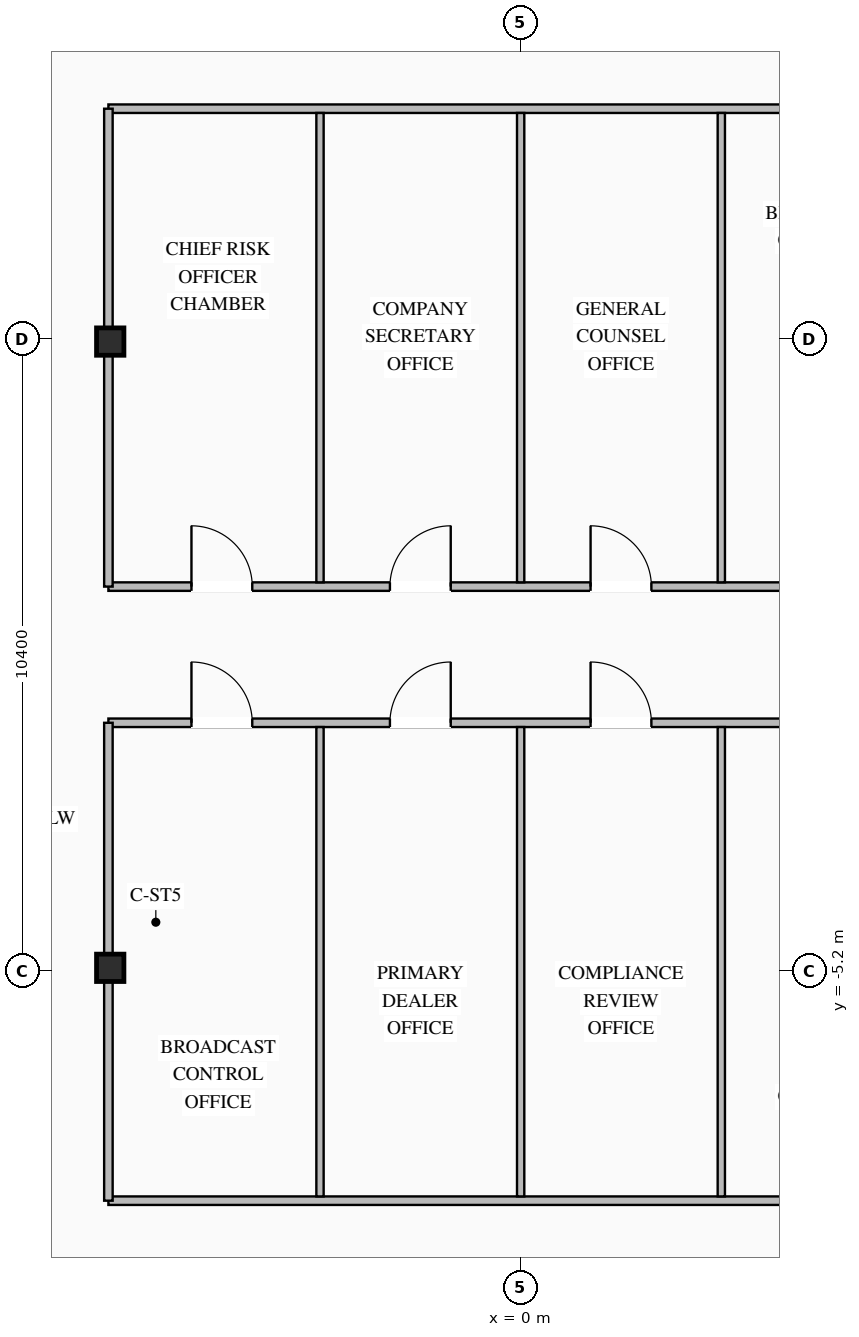
"""IFC4 building model, lengths in metres.
Left out: names, types, materials, properties, quantities, classifications, styles, units other than length and angle.
Written with IfcOpenShell. Run it as: python <this file> out.ifc"""

import sys

from ifc_helpers import new_model, si_unit, direction, frame, frame_2d, origin, origin_2d, place, context, subcontext, project, spatial, rectangle, i_section, extrude, element, fill, save


model = new_model("IFC4")
c1 = context("Model", 3, precision=1e-05, world=origin(), true_north=direction((0.0, 1.0)))
c2 = subcontext(c1, "Body", "Model", "MODEL_VIEW")
j1 = project(units=[si_unit("LENGTHUNIT", "METRE"), si_unit("PLANEANGLEUNIT", "RADIAN")], contexts=[c1])
p1 = place(None, origin())
s1 = spatial("IfcSite", under=j1, at=p1, CompositionType="ELEMENT")
p2 = place(p1, origin())
s2 = spatial("IfcBuilding", under=s1, at=p2, CompositionType="ELEMENT")
p3 = place(p2, frame((0.0, 0.0, 279.3)))
s3 = spatial("IfcBuildingStorey", under=s2, at=p3, CompositionType="ELEMENT", Elevation=279.3)
for number, where, z_axis, x_axis in (
    (1, (-6.75, -5.15, 0.0), (0.0, 0.0, 1.0), (1.0, 0.0, 0.0)),
    (2, (-6.75, 5.15, 0.0), (0.0, 0.0, 1.0), (1.0, 0.0, 0.0)),
):
    element("IfcColumn", number, at=place(p3, frame(where, z_axis=z_axis, x_axis=x_axis)), inside=s3, PredefinedType="COLUMN", context=c2, shape_type="SweptSolid", body=[
        extrude(i_section(OverallWidth=0.45, OverallDepth=0.45, WebThickness=0.022, FlangeThickness=0.032, at=origin_2d()), origin(), (0.0, 0.0, 1.0), 3.45),
    ])
p4 = place(p3, frame((-6.78, 1.12, 0.0), z_axis=(0.0, 0.0, 1.0), x_axis=(1.0, 0.0, 0.0)))
e3 = element("IfcWall", 3, at=p4, inside=s3, PredefinedType="STANDARD", context=c2, shape_type="SweptSolid", body=[
    extrude(rectangle(XDim=13.56, YDim=0.14, at=frame_2d((6.78, 0.0))), origin(), (0.0, 0.0, 1.0), 3.25),
])
p5 = place(p4, frame((1.366, 0.0, 0.0)))
e4 = element("IfcOpeningElement", 4, at=p5, cuts=e3, PredefinedType="OPENING", context=c2, shape_type="SweptSolid", body=[
    extrude(rectangle(XDim=1.0, YDim=2.08, at=frame_2d((0.5, 1.04))), frame((0.0, 0.08, 0.0), z_axis=(0.0, -1.0, 0.0), x_axis=(1.0, 0.0, 0.0)), (0.0, 0.0, 1.0), 0.16),
])
p6 = place(p4, frame((4.63, 0.0, 0.0)))
e5 = element("IfcOpeningElement", 5, at=p6, cuts=e3, PredefinedType="OPENING", context=c2, shape_type="SweptSolid", body=[
    extrude(rectangle(XDim=1.0, YDim=2.08, at=frame_2d((0.5, 1.04))), frame((0.0, 0.08, 0.0), z_axis=(0.0, -1.0, 0.0), x_axis=(1.0, 0.0, 0.0)), (0.0, 0.0, 1.0), 0.16),
])
p7 = place(p4, frame((7.93, 0.0, 0.0)))
e6 = element("IfcOpeningElement", 6, at=p7, cuts=e3, PredefinedType="OPENING", context=c2, shape_type="SweptSolid", body=[
    extrude(rectangle(XDim=1.0, YDim=2.08, at=frame_2d((0.5, 1.04))), frame((0.0, 0.08, 0.0), z_axis=(0.0, -1.0, 0.0), x_axis=(1.0, 0.0, 0.0)), (0.0, 0.0, 1.0), 0.16),
])
p8 = place(p4, frame((11.194, 0.0, 0.0)))
e7 = element("IfcOpeningElement", 7, at=p8, cuts=e3, PredefinedType="OPENING", context=c2, shape_type="SweptSolid", body=[
    extrude(rectangle(XDim=1.0, YDim=2.08, at=frame_2d((0.5, 1.04))), frame((0.0, 0.08, 0.0), z_axis=(0.0, -1.0, 0.0), x_axis=(1.0, 0.0, 0.0)), (0.0, 0.0, 1.0), 0.16),
])
p9 = place(p3, frame((-6.78, 8.98, 0.0), z_axis=(0.0, 0.0, 1.0), x_axis=(1.0, 0.0, 0.0)))
e8 = element("IfcWall", 8, at=p9, inside=s3, PredefinedType="STANDARD", context=c2, shape_type="SweptSolid", body=[
    extrude(rectangle(XDim=13.56, YDim=0.14, at=frame_2d((6.78, 0.0))), origin(), (0.0, 0.0, 1.0), 3.25),
])
p10 = place(p3, frame((-6.78, 1.12, 0.0), z_axis=(0.0, 0.0, 1.0), x_axis=(0.0, 1.0, 0.0)))
e9 = element("IfcWall", 9, at=p10, inside=s3, PredefinedType="STANDARD", context=c2, shape_type="SweptSolid", body=[
    extrude(rectangle(XDim=7.86, YDim=0.14, at=frame_2d((3.93, 0.0))), origin(), (0.0, 0.0, 1.0), 2.645),
])
for number, where, z_axis, x_axis in (
    (10, (-3.3, 1.19, 0.0), (0.0, 0.0, 1.0), (0.0, 1.0, 0.0)),
    (11, (0.0, 1.19, 0.0), (0.0, 0.0, 1.0), (0.0, 1.0, 0.0)),
    (12, (3.3, 1.19, 0.0), (0.0, 0.0, 1.0), (0.0, 1.0, 0.0)),
):
    element("IfcWall", number, at=place(p3, frame(where, z_axis=z_axis, x_axis=x_axis)), inside=s3, PredefinedType="STANDARD", context=c2, shape_type="SweptSolid", body=[
        extrude(rectangle(XDim=7.72, YDim=0.12, at=frame_2d((3.86, 0.0))), origin(), (0.0, 0.0, 1.0), 3.25),
    ])
p11 = place(p3, frame((-6.78, -1.12, 0.0), z_axis=(0.0, 0.0, 1.0), x_axis=(1.0, 0.0, 0.0)))
e13 = element("IfcWall", 13, at=p11, inside=s3, PredefinedType="STANDARD", context=c2, shape_type="SweptSolid", body=[
    extrude(rectangle(XDim=13.56, YDim=0.14, at=frame_2d((6.78, 0.0))), origin(), (0.0, 0.0, 1.0), 3.25),
])
p12 = place(p11, frame((1.366, 0.0, 0.0)))
e14 = element("IfcOpeningElement", 14, at=p12, cuts=e13, PredefinedType="OPENING", context=c2, shape_type="SweptSolid", body=[
    extrude(rectangle(XDim=1.0, YDim=2.08, at=frame_2d((0.5, 1.04))), frame((0.0, 0.08, 0.0), z_axis=(0.0, -1.0, 0.0), x_axis=(1.0, 0.0, 0.0)), (0.0, 0.0, 1.0), 0.16),
])
p13 = place(p11, frame((4.63, 0.0, 0.0)))
e15 = element("IfcOpeningElement", 15, at=p13, cuts=e13, PredefinedType="OPENING", context=c2, shape_type="SweptSolid", body=[
    extrude(rectangle(XDim=1.0, YDim=2.08, at=frame_2d((0.5, 1.04))), frame((0.0, 0.08, 0.0), z_axis=(0.0, -1.0, 0.0), x_axis=(1.0, 0.0, 0.0)), (0.0, 0.0, 1.0), 0.16),
])
p14 = place(p11, frame((7.93, 0.0, 0.0)))
e16 = element("IfcOpeningElement", 16, at=p14, cuts=e13, PredefinedType="OPENING", context=c2, shape_type="SweptSolid", body=[
    extrude(rectangle(XDim=1.0, YDim=2.08, at=frame_2d((0.5, 1.04))), frame((0.0, 0.08, 0.0), z_axis=(0.0, -1.0, 0.0), x_axis=(1.0, 0.0, 0.0)), (0.0, 0.0, 1.0), 0.16),
])
p15 = place(p11, frame((11.194, 0.0, 0.0)))
e17 = element("IfcOpeningElement", 17, at=p15, cuts=e13, PredefinedType="OPENING", context=c2, shape_type="SweptSolid", body=[
    extrude(rectangle(XDim=1.0, YDim=2.08, at=frame_2d((0.5, 1.04))), frame((0.0, 0.08, 0.0), z_axis=(0.0, -1.0, 0.0), x_axis=(1.0, 0.0, 0.0)), (0.0, 0.0, 1.0), 0.16),
])
p16 = place(p3, frame((-6.78, -8.98, 0.0), z_axis=(0.0, 0.0, 1.0), x_axis=(1.0, 0.0, 0.0)))
e18 = element("IfcWall", 18, at=p16, inside=s3, PredefinedType="STANDARD", context=c2, shape_type="SweptSolid", body=[
    extrude(rectangle(XDim=13.56, YDim=0.14, at=frame_2d((6.78, 0.0))), origin(), (0.0, 0.0, 1.0), 3.25),
])
p17 = place(p3, frame((-6.78, -8.98, 0.0), z_axis=(0.0, 0.0, 1.0), x_axis=(0.0, 1.0, 0.0)))
e19 = element("IfcWall", 19, at=p17, inside=s3, PredefinedType="STANDARD", context=c2, shape_type="SweptSolid", body=[
    extrude(rectangle(XDim=7.86, YDim=0.14, at=frame_2d((3.93, 0.0))), origin(), (0.0, 0.0, 1.0), 2.645),
])
for number, where, z_axis, x_axis in (
    (20, (-3.3, -8.91, 0.0), (0.0, 0.0, 1.0), (0.0, 1.0, 0.0)),
    (21, (0.0, -8.91, 0.0), (0.0, 0.0, 1.0), (0.0, 1.0, 0.0)),
    (22, (3.3, -8.91, 0.0), (0.0, 0.0, 1.0), (0.0, 1.0, 0.0)),
):
    element("IfcWall", number, at=place(p3, frame(where, z_axis=z_axis, x_axis=x_axis)), inside=s3, PredefinedType="STANDARD", context=c2, shape_type="SweptSolid", body=[
        extrude(rectangle(XDim=7.72, YDim=0.12, at=frame_2d((3.86, 0.0))), origin(), (0.0, 0.0, 1.0), 3.25),
    ])
p18 = place(p5, origin())
e23 = element("IfcDoor", 23, at=p18, inside=s3, OperationType="SINGLE_SWING_LEFT", PredefinedType="DOOR", context=c2, shape_type="SweptSolid", body=[
    extrude(rectangle(XDim=1.0, YDim=2.08, at=frame_2d((0.5, 1.04))), frame((0.0, 0.025, 0.0), z_axis=(0.0, -1.0, 0.0), x_axis=(1.0, 0.0, 0.0)), (0.0, 0.0, 1.0), 0.05),
])
fill(e4, e23)
p19 = place(p6, origin())
e24 = element("IfcDoor", 24, at=p19, inside=s3, OperationType="SINGLE_SWING_RIGHT", PredefinedType="DOOR", context=c2, shape_type="SweptSolid", body=[
    extrude(rectangle(XDim=1.0, YDim=2.08, at=frame_2d((0.5, 1.04))), frame((0.0, 0.025, 0.0), z_axis=(0.0, -1.0, 0.0), x_axis=(1.0, 0.0, 0.0)), (0.0, 0.0, 1.0), 0.05),
])
fill(e5, e24)
p20 = place(p7, origin())
e25 = element("IfcDoor", 25, at=p20, inside=s3, OperationType="SINGLE_SWING_LEFT", PredefinedType="DOOR", context=c2, shape_type="SweptSolid", body=[
    extrude(rectangle(XDim=1.0, YDim=2.08, at=frame_2d((0.5, 1.04))), frame((0.0, 0.025, 0.0), z_axis=(0.0, -1.0, 0.0), x_axis=(1.0, 0.0, 0.0)), (0.0, 0.0, 1.0), 0.05),
])
fill(e6, e25)
p21 = place(p12, origin())
e26 = element("IfcDoor", 26, at=p21, inside=s3, OperationType="SINGLE_SWING_LEFT", PredefinedType="DOOR", context=c2, shape_type="SweptSolid", body=[
    extrude(rectangle(XDim=1.0, YDim=2.08, at=frame_2d((0.5, 1.04))), frame((0.0, 0.025, 0.0), z_axis=(0.0, -1.0, 0.0), x_axis=(1.0, 0.0, 0.0)), (0.0, 0.0, 1.0), 0.05),
])
fill(e14, e26)
p22 = place(p13, origin())
e27 = element("IfcDoor", 27, at=p22, inside=s3, OperationType="SINGLE_SWING_RIGHT", PredefinedType="DOOR", context=c2, shape_type="SweptSolid", body=[
    extrude(rectangle(XDim=1.0, YDim=2.08, at=frame_2d((0.5, 1.04))), frame((0.0, 0.025, 0.0), z_axis=(0.0, -1.0, 0.0), x_axis=(1.0, 0.0, 0.0)), (0.0, 0.0, 1.0), 0.05),
])
fill(e15, e27)
p23 = place(p14, origin())
e28 = element("IfcDoor", 28, at=p23, inside=s3, OperationType="SINGLE_SWING_LEFT", PredefinedType="DOOR", context=c2, shape_type="SweptSolid", body=[
    extrude(rectangle(XDim=1.0, YDim=2.08, at=frame_2d((0.5, 1.04))), frame((0.0, 0.025, 0.0), z_axis=(0.0, -1.0, 0.0), x_axis=(1.0, 0.0, 0.0)), (0.0, 0.0, 1.0), 0.05),
])
fill(e16, e28)
save(model, sys.argv[1])
